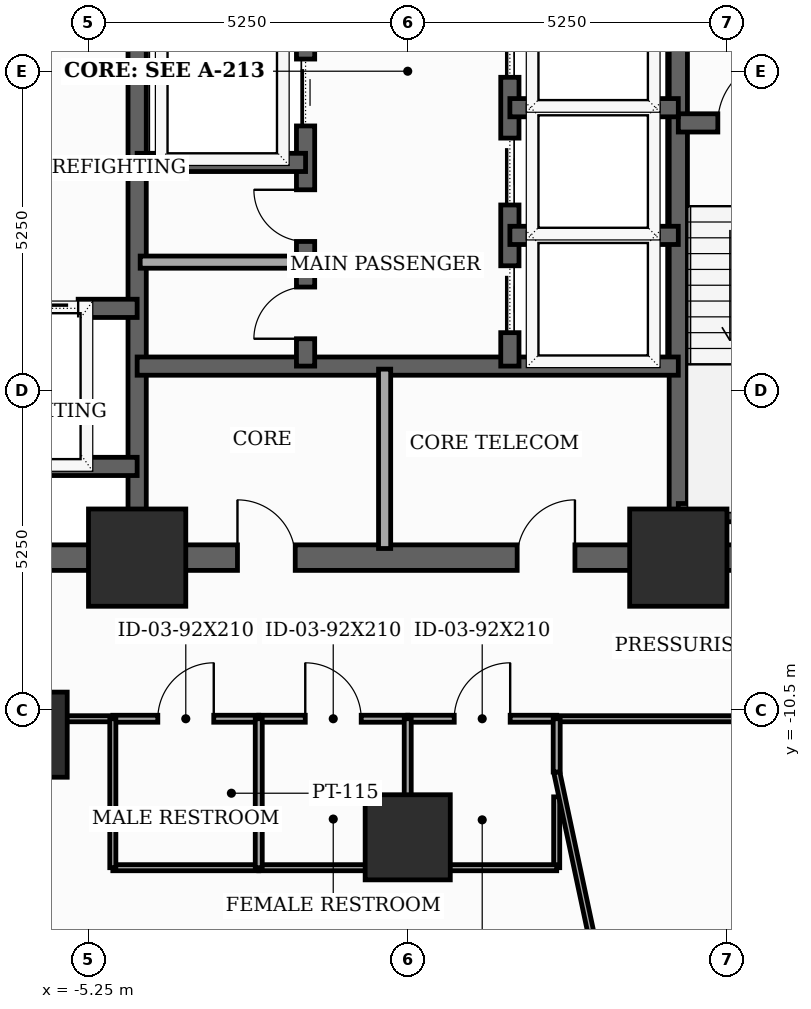
"""IFC4 building model, lengths in metres.
Left out: names, types, materials, properties, quantities, classifications, styles, units other than length and angle.
Written with IfcOpenShell. Run it as: python <this file> out.ifc"""

import sys

from ifc_helpers import new_model, si_unit, direction, frame, frame_2d, origin, origin_2d, place, context, subcontext, project, spatial, rectangle, extrude, element, fill, save


model = new_model("IFC4")
c1 = context("Model", 3, precision=1e-05, world=origin(), true_north=direction((0.0, 1.0)))
c2 = subcontext(c1, "Body", "Model", "MODEL_VIEW")
j1 = project(units=[si_unit("LENGTHUNIT", "METRE"), si_unit("PLANEANGLEUNIT", "RADIAN")], contexts=[c1])
p1 = place(None, origin())
s1 = spatial("IfcSite", under=j1, at=p1, CompositionType="ELEMENT")
p2 = place(p1, origin())
s2 = spatial("IfcBuilding", under=s1, at=p2, CompositionType="ELEMENT")
p3 = place(p2, frame((0.0, 0.0, 33.4)))
s3 = spatial("IfcBuildingStorey", under=s2, at=p3, CompositionType="ELEMENT", Elevation=33.4)
for number, where, z_axis, x_axis in (
    (1, (-4.45, -8.0, 0.0), (0.0, 0.0, 1.0), (1.0, 0.0, 0.0)),
    (2, (4.45, -8.0, 0.0), (0.0, 0.0, 1.0), (1.0, 0.0, 0.0)),
):
    element("IfcColumn", number, at=place(p3, frame(where, z_axis=z_axis, x_axis=x_axis)), inside=s3, PredefinedType="COLUMN", context=c2, shape_type="SweptSolid", body=[
        extrude(rectangle(XDim=1.6, YDim=1.6, at=origin_2d()), origin(), (0.0, 0.0, 1.0), 3.7),
    ])
for number, where, z_axis, x_axis in (
    (3, (-6.3, -10.912, 0.0), (0.0, 0.0, 1.0), (1.0, 0.0, 0.0)),
    (4, (0.0, -12.6, 0.0), (0.0, 0.0, 1.0), (1.0, 0.0, 0.0)),
):
    element("IfcColumn", number, at=place(p3, frame(where, z_axis=z_axis, x_axis=x_axis)), inside=s3, PredefinedType="COLUMN", context=c2, shape_type="SweptSolid", body=[
        extrude(rectangle(XDim=1.4, YDim=1.4, at=origin_2d()), origin(), (0.0, 0.0, 1.0), 3.7),
    ])
p4 = place(p3, frame((-8.0, -8.0, 0.0), z_axis=(0.0, 0.0, 1.0), x_axis=(1.0, 0.0, 0.0)))
e5 = element("IfcWall", 5, at=p4, inside=s3, PredefinedType="SHEAR", context=c2, shape_type="SweptSolid", body=[
    extrude(rectangle(XDim=16.0, YDim=0.42, at=frame_2d((8.0, 0.0))), origin(), (0.0, 0.0, 1.0), 3.5),
])
p5 = place(p4, frame((5.2, 0.0, 0.0)))
e6 = element("IfcOpeningElement", 6, at=p5, cuts=e5, PredefinedType="OPENING", context=c2, shape_type="SweptSolid", body=[
    extrude(rectangle(XDim=0.95, YDim=2.1, at=frame_2d((0.475, 1.05))), frame((0.0, 0.22, 0.0), z_axis=(0.0, -1.0, 0.0), x_axis=(1.0, 0.0, 0.0)), (0.0, 0.0, 1.0), 0.44),
])
p6 = place(p4, frame((9.8, 0.0, 0.0)))
e7 = element("IfcOpeningElement", 7, at=p6, cuts=e5, PredefinedType="OPENING", context=c2, shape_type="SweptSolid", body=[
    extrude(rectangle(XDim=0.95, YDim=2.1, at=frame_2d((0.475, 1.05))), frame((0.0, 0.22, 0.0), z_axis=(0.0, -1.0, 0.0), x_axis=(1.0, 0.0, 0.0)), (0.0, 0.0, 1.0), 0.44),
])
for number, where, z_axis, x_axis in (
    (8, (-4.45, -7.79, 0.0), (0.0, 0.0, 1.0), (0.0, 1.0, 0.0)),
    (9, (4.45, -7.79, 0.0), (0.0, 0.0, 1.0), (0.0, 1.0, 0.0)),
):
    element("IfcWall", number, at=place(p3, frame(where, z_axis=z_axis, x_axis=x_axis)), inside=s3, PredefinedType="SHEAR", context=c2, shape_type="SweptSolid", body=[
        extrude(rectangle(XDim=15.58, YDim=0.3, at=frame_2d((7.79, 0.0))), origin(), (0.0, 0.0, 1.0), 3.5),
    ])
p7 = place(p3, frame((4.45, -0.85, 0.0), z_axis=(0.0, 0.0, 1.0), x_axis=(1.0, 0.0, 0.0)))
e10 = element("IfcWall", 10, at=p7, inside=s3, PredefinedType="SHEAR", context=c2, shape_type="SweptSolid", body=[
    extrude(rectangle(XDim=3.34, YDim=0.3, at=frame_2d((1.67, 0.0))), origin(), (0.0, 0.0, 1.0), 3.5),
])
p8 = place(p7, frame((0.65, 0.0, 0.0)))
e11 = element("IfcOpeningElement", 11, at=p8, cuts=e10, PredefinedType="OPENING", context=c2, shape_type="SweptSolid", body=[
    extrude(rectangle(XDim=1.05, YDim=2.15, at=frame_2d((0.525, 1.075))), frame((0.0, 0.16, 0.0), z_axis=(0.0, -1.0, 0.0), x_axis=(1.0, 0.0, 0.0)), (0.0, 0.0, 1.0), 0.32),
])
p9 = place(p3, frame((4.45, -7.26, 0.0), z_axis=(0.0, 0.0, 1.0), x_axis=(1.0, 0.0, 0.0)))
e12 = element("IfcWall", 12, at=p9, inside=s3, PredefinedType="SHEAR", context=c2, shape_type="SweptSolid", body=[
    extrude(rectangle(XDim=3.55, YDim=0.3, at=frame_2d((1.775, 0.0))), origin(), (0.0, 0.0, 1.0), 3.5),
])
p10 = place(p3, frame((-7.79, -3.9, 0.0), z_axis=(0.0, 0.0, 1.0), x_axis=(1.0, 0.0, 0.0)))
e13 = element("IfcWall", 13, at=p10, inside=s3, PredefinedType="SHEAR", context=c2, shape_type="SweptSolid", body=[
    extrude(rectangle(XDim=3.34, YDim=0.3, at=frame_2d((1.67, 0.0))), origin(), (0.0, 0.0, 1.0), 3.5),
])
p11 = place(p10, frame((1.27, 0.0, 0.0)))
e14 = element("IfcOpeningElement", 14, at=p11, cuts=e13, PredefinedType="OPENING", context=c2, shape_type="SweptSolid", body=[
    extrude(rectangle(XDim=1.1, YDim=2.1, at=frame_2d((0.55, 1.05))), frame((0.0, 0.16, 0.0), z_axis=(0.0, -1.0, 0.0), x_axis=(1.0, 0.0, 0.0)), (0.0, 0.0, 1.0), 0.32),
])
p12 = place(p3, frame((-7.79, -6.5, 0.0), z_axis=(0.0, 0.0, 1.0), x_axis=(1.0, 0.0, 0.0)))
e15 = element("IfcWall", 15, at=p12, inside=s3, PredefinedType="SHEAR", context=c2, shape_type="SweptSolid", body=[
    extrude(rectangle(XDim=3.34, YDim=0.3, at=frame_2d((1.67, 0.0))), origin(), (0.0, 0.0, 1.0), 3.5),
])
p13 = place(p3, frame((-4.45, -4.85, 0.0), z_axis=(0.0, 0.0, 1.0), x_axis=(1.0, 0.0, 0.0)))
e16 = element("IfcWall", 16, at=p13, inside=s3, PredefinedType="SHEAR", context=c2, shape_type="SweptSolid", body=[
    extrude(rectangle(XDim=8.9, YDim=0.3, at=frame_2d((4.45, 0.0))), origin(), (0.0, 0.0, 1.0), 3.5),
])
p14 = place(p3, frame((-1.68, -4.85, 0.0), z_axis=(0.0, 0.0, 1.0), x_axis=(0.0, 1.0, 0.0)))
e17 = element("IfcWall", 17, at=p14, inside=s3, PredefinedType="SHEAR", context=c2, shape_type="SweptSolid", body=[
    extrude(rectangle(XDim=12.64, YDim=0.3, at=frame_2d((6.32, 0.0))), origin(), (0.0, 0.0, 1.0), 3.5),
])
p15 = place(p14, frame((3.95, 0.0, 0.0)))
e18 = element("IfcOpeningElement", 18, at=p15, cuts=e17, PredefinedType="OPENING", context=c2, shape_type="SweptSolid", body=[
    extrude(rectangle(XDim=1.1, YDim=2.1, at=frame_2d((0.55, 1.05))), frame((0.0, 0.16, 0.0), z_axis=(0.0, -1.0, 0.0), x_axis=(1.0, 0.0, 0.0)), (0.0, 0.0, 1.0), 0.32),
])
p16 = place(p14, frame((6.25, 0.0, 0.0)))
e19 = element("IfcOpeningElement", 19, at=p16, cuts=e17, PredefinedType="OPENING", context=c2, shape_type="SweptSolid", body=[
    extrude(rectangle(XDim=1.1, YDim=2.1, at=frame_2d((0.55, 1.05))), frame((0.0, 0.16, 0.0), z_axis=(0.0, -1.0, 0.0), x_axis=(1.0, 0.0, 0.0)), (0.0, 0.0, 1.0), 0.32),
])
p17 = place(p14, frame((8.55, 0.0, 0.0)))
e20 = element("IfcOpeningElement", 20, at=p17, cuts=e17, PredefinedType="OPENING", context=c2, shape_type="SweptSolid", body=[
    extrude(rectangle(XDim=1.1, YDim=2.1, at=frame_2d((0.55, 1.05))), frame((0.0, 0.16, 0.0), z_axis=(0.0, -1.0, 0.0), x_axis=(1.0, 0.0, 0.0)), (0.0, 0.0, 1.0), 0.32),
])
p18 = place(p14, frame((10.85, 0.0, 0.0)))
e21 = element("IfcOpeningElement", 21, at=p18, cuts=e17, PredefinedType="OPENING", context=c2, shape_type="SweptSolid", body=[
    extrude(rectangle(XDim=1.1, YDim=2.1, at=frame_2d((0.55, 1.05))), frame((0.0, 0.16, 0.0), z_axis=(0.0, -1.0, 0.0), x_axis=(1.0, 0.0, 0.0)), (0.0, 0.0, 1.0), 0.32),
])
p19 = place(p14, frame((0.45, 0.0, 0.0)))
e22 = element("IfcOpeningElement", 22, at=p19, cuts=e17, PredefinedType="OPENING", context=c2, shape_type="SweptSolid", body=[
    extrude(rectangle(XDim=0.85, YDim=2.02, at=frame_2d((0.425, 1.01))), frame((0.0, 0.16, 0.0), z_axis=(0.0, -1.0, 0.0), x_axis=(1.0, 0.0, 0.0)), (0.0, 0.0, 1.0), 0.32),
])
p20 = place(p14, frame((2.05, 0.0, 0.0)))
e23 = element("IfcOpeningElement", 23, at=p20, cuts=e17, PredefinedType="OPENING", context=c2, shape_type="SweptSolid", body=[
    extrude(rectangle(XDim=0.85, YDim=2.02, at=frame_2d((0.425, 1.01))), frame((0.0, 0.16, 0.0), z_axis=(0.0, -1.0, 0.0), x_axis=(1.0, 0.0, 0.0)), (0.0, 0.0, 1.0), 0.32),
])
p21 = place(p3, frame((1.68, -4.85, 0.0), z_axis=(0.0, 0.0, 1.0), x_axis=(0.0, 1.0, 0.0)))
e24 = element("IfcWall", 24, at=p21, inside=s3, PredefinedType="SHEAR", context=c2, shape_type="SweptSolid", body=[
    extrude(rectangle(XDim=12.64, YDim=0.3, at=frame_2d((6.32, 0.0))), origin(), (0.0, 0.0, 1.0), 3.5),
])
p22 = place(p21, frame((0.55, 0.0, 0.0)))
e25 = element("IfcOpeningElement", 25, at=p22, cuts=e24, PredefinedType="OPENING", context=c2, shape_type="SweptSolid", body=[
    extrude(rectangle(XDim=1.1, YDim=2.1, at=frame_2d((0.55, 1.05))), frame((0.0, 0.16, 0.0), z_axis=(0.0, -1.0, 0.0), x_axis=(1.0, 0.0, 0.0)), (0.0, 0.0, 1.0), 0.32),
])
p23 = place(p21, frame((2.65, 0.0, 0.0)))
e26 = element("IfcOpeningElement", 26, at=p23, cuts=e24, PredefinedType="OPENING", context=c2, shape_type="SweptSolid", body=[
    extrude(rectangle(XDim=1.1, YDim=2.1, at=frame_2d((0.55, 1.05))), frame((0.0, 0.16, 0.0), z_axis=(0.0, -1.0, 0.0), x_axis=(1.0, 0.0, 0.0)), (0.0, 0.0, 1.0), 0.32),
])
p24 = place(p21, frame((4.75, 0.0, 0.0)))
e27 = element("IfcOpeningElement", 27, at=p24, cuts=e24, PredefinedType="OPENING", context=c2, shape_type="SweptSolid", body=[
    extrude(rectangle(XDim=1.1, YDim=2.1, at=frame_2d((0.55, 1.05))), frame((0.0, 0.16, 0.0), z_axis=(0.0, -1.0, 0.0), x_axis=(1.0, 0.0, 0.0)), (0.0, 0.0, 1.0), 0.32),
])
p25 = place(p21, frame((6.85, 0.0, 0.0)))
e28 = element("IfcOpeningElement", 28, at=p25, cuts=e24, PredefinedType="OPENING", context=c2, shape_type="SweptSolid", body=[
    extrude(rectangle(XDim=1.1, YDim=2.1, at=frame_2d((0.55, 1.05))), frame((0.0, 0.16, 0.0), z_axis=(0.0, -1.0, 0.0), x_axis=(1.0, 0.0, 0.0)), (0.0, 0.0, 1.0), 0.32),
])
p26 = place(p21, frame((8.95, 0.0, 0.0)))
e29 = element("IfcOpeningElement", 29, at=p26, cuts=e24, PredefinedType="OPENING", context=c2, shape_type="SweptSolid", body=[
    extrude(rectangle(XDim=1.1, YDim=2.1, at=frame_2d((0.55, 1.05))), frame((0.0, 0.16, 0.0), z_axis=(0.0, -1.0, 0.0), x_axis=(1.0, 0.0, 0.0)), (0.0, 0.0, 1.0), 0.32),
])
p27 = place(p21, frame((11.05, 0.0, 0.0)))
e30 = element("IfcOpeningElement", 30, at=p27, cuts=e24, PredefinedType="OPENING", context=c2, shape_type="SweptSolid", body=[
    extrude(rectangle(XDim=1.1, YDim=2.1, at=frame_2d((0.55, 1.05))), frame((0.0, 0.16, 0.0), z_axis=(0.0, -1.0, 0.0), x_axis=(1.0, 0.0, 0.0)), (0.0, 0.0, 1.0), 0.32),
])
for number, where, z_axis, x_axis in (
    (31, (-4.45, -1.5, 0.0), (0.0, 0.0, 1.0), (1.0, 0.0, 0.0)),
    (32, (1.68, -2.7, 0.0), (0.0, 0.0, 1.0), (1.0, 0.0, 0.0)),
    (33, (1.68, -0.6, 0.0), (0.0, 0.0, 1.0), (1.0, 0.0, 0.0)),
):
    element("IfcWall", number, at=place(p3, frame(where, z_axis=z_axis, x_axis=x_axis)), inside=s3, PredefinedType="SHEAR", context=c2, shape_type="SweptSolid", body=[
        extrude(rectangle(XDim=2.77, YDim=0.3, at=frame_2d((1.385, 0.0))), origin(), (0.0, 0.0, 1.0), 3.5),
    ])
p28 = place(p3, frame((-0.38, -7.85, 0.0), z_axis=(0.0, 0.0, 1.0), x_axis=(0.0, 1.0, 0.0)))
e34 = element("IfcWall", 34, at=p28, inside=s3, PredefinedType="SOLIDWALL", context=c2, shape_type="SweptSolid", body=[
    extrude(rectangle(XDim=2.95, YDim=0.2, at=frame_2d((1.475, 0.0))), origin(), (0.0, 0.0, 1.0), 2.885),
])
p29 = place(p3, frame((-4.4, -3.14, 0.0), z_axis=(0.0, 0.0, 1.0), x_axis=(1.0, 0.0, 0.0)))
e35 = element("IfcWall", 35, at=p29, inside=s3, PredefinedType="SOLIDWALL", context=c2, shape_type="SweptSolid", body=[
    extrude(rectangle(XDim=2.68, YDim=0.2, at=frame_2d((1.34, 0.0))), origin(), (0.0, 0.0, 1.0), 3.5),
])
p30 = place(p3, frame((-10.15, -10.65, 0.0), z_axis=(0.0, 0.0, 1.0), x_axis=(1.0, 0.0, 0.0)))
e36 = element("IfcWall", 36, at=p30, inside=s3, PredefinedType="MOVABLE", context=c2, shape_type="SweptSolid", body=[
    extrude(rectangle(XDim=5.3, YDim=0.1, at=frame_2d((2.65, 0.0))), origin(), (0.0, 0.0, 1.0), 2.785),
])
p31 = place(p30, frame((0.6, 0.0, 0.0)))
e37 = element("IfcOpeningElement", 37, at=p31, cuts=e36, PredefinedType="OPENING", context=c2, shape_type="SweptSolid", body=[
    extrude(rectangle(XDim=0.92, YDim=2.1, at=frame_2d((0.46, 1.05))), frame((0.0, 0.06, 0.0), z_axis=(0.0, -1.0, 0.0), x_axis=(1.0, 0.0, 0.0)), (0.0, 0.0, 1.0), 0.12),
])
p32 = place(p3, frame((-4.85, -10.65, 0.0), z_axis=(0.0, 0.0, 1.0), x_axis=(1.0, 0.0, 0.0)))
e38 = element("IfcWall", 38, at=p32, inside=s3, PredefinedType="PARTITIONING", context=c2, shape_type="SweptSolid", body=[
    extrude(rectangle(XDim=2.4, YDim=0.115, at=frame_2d((1.2, 0.0))), origin(), (0.0, 0.0, 1.0), 3.5),
])
p33 = place(p32, frame((0.74, 0.0, 0.0)))
e39 = element("IfcOpeningElement", 39, at=p33, cuts=e38, PredefinedType="OPENING", context=c2, shape_type="SweptSolid", body=[
    extrude(rectangle(XDim=0.92, YDim=2.1, at=frame_2d((0.46, 1.05))), frame((0.0, 0.067, 0.0), z_axis=(0.0, -1.0, 0.0), x_axis=(1.0, 0.0, 0.0)), (0.0, 0.0, 1.0), 0.135),
])
p34 = place(p3, frame((-2.45, -10.65, 0.0), z_axis=(0.0, 0.0, 1.0), x_axis=(1.0, 0.0, 0.0)))
e40 = element("IfcWall", 40, at=p34, inside=s3, PredefinedType="PARTITIONING", context=c2, shape_type="SweptSolid", body=[
    extrude(rectangle(XDim=2.45, YDim=0.115, at=frame_2d((1.225, 0.0))), origin(), (0.0, 0.0, 1.0), 2.785),
])
p35 = place(p34, frame((0.765, 0.0, 0.0)))
e41 = element("IfcOpeningElement", 41, at=p35, cuts=e40, PredefinedType="OPENING", context=c2, shape_type="SweptSolid", body=[
    extrude(rectangle(XDim=0.92, YDim=2.1, at=frame_2d((0.46, 1.05))), frame((0.0, 0.067, 0.0), z_axis=(0.0, -1.0, 0.0), x_axis=(1.0, 0.0, 0.0)), (0.0, 0.0, 1.0), 0.135),
])
p36 = place(p3, frame((0.0, -10.65, 0.0), z_axis=(0.0, 0.0, 1.0), x_axis=(1.0, 0.0, 0.0)))
e42 = element("IfcWall", 42, at=p36, inside=s3, PredefinedType="PARTITIONING", context=c2, shape_type="SweptSolid", body=[
    extrude(rectangle(XDim=2.45, YDim=0.115, at=frame_2d((1.225, 0.0))), origin(), (0.0, 0.0, 1.0), 3.5),
])
p37 = place(p36, frame((0.765, 0.0, 0.0)))
e43 = element("IfcOpeningElement", 43, at=p37, cuts=e42, PredefinedType="OPENING", context=c2, shape_type="SweptSolid", body=[
    extrude(rectangle(XDim=0.92, YDim=2.1, at=frame_2d((0.46, 1.05))), frame((0.0, 0.067, 0.0), z_axis=(0.0, -1.0, 0.0), x_axis=(1.0, 0.0, 0.0)), (0.0, 0.0, 1.0), 0.135),
])
p38 = place(p3, frame((2.45, -10.65, 0.0), z_axis=(0.0, 0.0, 1.0), x_axis=(1.0, 0.0, 0.0)))
e44 = element("IfcWall", 44, at=p38, inside=s3, PredefinedType="MOVABLE", context=c2, shape_type="SweptSolid", body=[
    extrude(rectangle(XDim=7.7, YDim=0.1, at=frame_2d((3.85, 0.0))), origin(), (0.0, 0.0, 1.0), 2.785),
])
p39 = place(p3, frame((-3.33, -15.445, 0.0), z_axis=(0.0, 0.0, 1.0), x_axis=(-0.90631018164, 0.422613126458, 0.0)))
e45 = element("IfcWall", 45, at=p39, inside=s3, PredefinedType="PARTITIONING", context=c2, shape_type="SweptSolid", body=[
    extrude(rectangle(XDim=7.018, YDim=0.135, at=frame_2d((3.509, 0.0))), origin(), (0.0, 0.0, 1.0), 2.685),
])
p40 = place(p3, frame((-2.45, -13.1, 0.0), z_axis=(0.0, 0.0, 1.0), x_axis=(-1.0, 0.0, 0.0)))
e46 = element("IfcWall", 46, at=p40, inside=s3, PredefinedType="MOVABLE", context=c2, shape_type="SweptSolid", body=[
    extrude(rectangle(XDim=2.4, YDim=0.1, at=frame_2d((1.2, 0.0))), origin(), (0.0, 0.0, 1.0), 3.5),
])
p41 = place(p3, frame((-4.85, -13.1, 0.0), z_axis=(0.0, 0.0, 1.0), x_axis=(0.0, 1.0, 0.0)))
e47 = element("IfcWall", 47, at=p41, inside=s3, PredefinedType="MOVABLE", context=c2, shape_type="SweptSolid", body=[
    extrude(rectangle(XDim=2.45, YDim=0.1, at=frame_2d((1.225, 0.0))), origin(), (0.0, 0.0, 1.0), 2.785),
])
p42 = place(p3, frame((0.0, -13.1, 0.0), z_axis=(0.0, 0.0, 1.0), x_axis=(-1.0, 0.0, 0.0)))
e48 = element("IfcWall", 48, at=p42, inside=s3, PredefinedType="MOVABLE", context=c2, shape_type="SweptSolid", body=[
    extrude(rectangle(XDim=2.45, YDim=0.1, at=frame_2d((1.225, 0.0))), origin(), (0.0, 0.0, 1.0), 3.5),
])
p43 = place(p3, frame((2.45, -11.935, 0.0), z_axis=(0.0, 0.0, 1.0), x_axis=(0.0, -1.0, 0.0)))
e49 = element("IfcWall", 49, at=p43, inside=s3, PredefinedType="MOVABLE", context=c2, shape_type="SweptSolid", body=[
    extrude(rectangle(XDim=1.166, YDim=0.1, at=frame_2d((0.583, 0.0))), origin(), (0.0, 0.0, 1.0), 2.785),
])
p44 = place(p3, frame((2.45, -13.1, 0.0), z_axis=(0.0, 0.0, 1.0), x_axis=(-1.0, 0.0, 0.0)))
e50 = element("IfcWall", 50, at=p44, inside=s3, PredefinedType="MOVABLE", context=c2, shape_type="SweptSolid", body=[
    extrude(rectangle(XDim=2.45, YDim=0.1, at=frame_2d((1.225, 0.0))), origin(), (0.0, 0.0, 1.0), 3.5),
])
p45 = place(p3, frame((3.267, -15.368, 0.0), z_axis=(0.0, 0.0, 1.0), x_axis=(-0.208030469109, 0.978122346091, 0.0)))
e51 = element("IfcWall", 51, at=p45, inside=s3, PredefinedType="MOVABLE", context=c2, shape_type="SweptSolid", body=[
    extrude(rectangle(XDim=3.928, YDim=0.1, at=frame_2d((1.964, 0.0))), origin(), (0.0, 0.0, 1.0), 2.785),
])
for number, where, z_axis, x_axis in (
    (52, (-2.45, -13.1, 0.0), (0.0, 0.0, 1.0), (0.0, 1.0, 0.0)),
    (53, (0.0, -13.1, 0.0), (0.0, 0.0, 1.0), (0.0, 1.0, 0.0)),
):
    element("IfcWall", number, at=place(p3, frame(where, z_axis=z_axis, x_axis=x_axis)), inside=s3, PredefinedType="PARTITIONING", context=c2, shape_type="SweptSolid", body=[
        extrude(rectangle(XDim=2.45, YDim=0.115, at=frame_2d((1.225, 0.0))), origin(), (0.0, 0.0, 1.0), 2.785),
    ])
p46 = place(p3, frame((2.45, -11.526, 0.0), z_axis=(0.0, 0.0, 1.0), x_axis=(0.0, 1.0, 0.0)))
e54 = element("IfcWall", 54, at=p46, inside=s3, PredefinedType="PARTITIONING", context=c2, shape_type="SweptSolid", body=[
    extrude(rectangle(XDim=0.876, YDim=0.115, at=frame_2d((0.438, 0.0))), origin(), (0.0, 0.0, 1.0), 3.5),
])
p47 = place(p5, origin())
e55 = element("IfcDoor", 55, at=p47, inside=s3, OperationType="SINGLE_SWING_LEFT", PredefinedType="DOOR", context=c2, shape_type="SweptSolid", body=[
    extrude(rectangle(XDim=0.95, YDim=2.1, at=frame_2d((0.475, 1.05))), frame((0.0, 0.025, 0.0), z_axis=(0.0, -1.0, 0.0), x_axis=(1.0, 0.0, 0.0)), (0.0, 0.0, 1.0), 0.05),
])
fill(e6, e55)
p48 = place(p6, origin())
e56 = element("IfcDoor", 56, at=p48, inside=s3, OperationType="SINGLE_SWING_RIGHT", PredefinedType="DOOR", context=c2, shape_type="SweptSolid", body=[
    extrude(rectangle(XDim=0.95, YDim=2.1, at=frame_2d((0.475, 1.05))), frame((0.0, 0.025, 0.0), z_axis=(0.0, -1.0, 0.0), x_axis=(1.0, 0.0, 0.0)), (0.0, 0.0, 1.0), 0.05),
])
fill(e7, e56)
p49 = place(p8, origin())
e57 = element("IfcDoor", 57, at=p49, inside=s3, OperationType="SINGLE_SWING_RIGHT", PredefinedType="DOOR", context=c2, shape_type="SweptSolid", body=[
    extrude(rectangle(XDim=1.05, YDim=2.15, at=frame_2d((0.525, 1.075))), frame((0.0, 0.025, 0.0), z_axis=(0.0, -1.0, 0.0), x_axis=(1.0, 0.0, 0.0)), (0.0, 0.0, 1.0), 0.05),
])
fill(e11, e57)
p50 = place(p11, origin())
e58 = element("IfcDoor", 58, at=p50, inside=s3, OperationType="SLIDING_TO_LEFT", PredefinedType="DOOR", context=c2, shape_type="SweptSolid", body=[
    extrude(rectangle(XDim=1.1, YDim=2.1, at=frame_2d((0.55, 1.05))), frame((0.0, 0.025, 0.0), z_axis=(0.0, -1.0, 0.0), x_axis=(1.0, 0.0, 0.0)), (0.0, 0.0, 1.0), 0.05),
])
fill(e14, e58)
p51 = place(p15, origin())
e59 = element("IfcDoor", 59, at=p51, inside=s3, OperationType="SLIDING_TO_LEFT", PredefinedType="DOOR", context=c2, shape_type="SweptSolid", body=[
    extrude(rectangle(XDim=1.1, YDim=2.1, at=frame_2d((0.55, 1.05))), frame((0.0, 0.025, 0.0), z_axis=(0.0, -1.0, 0.0), x_axis=(1.0, 0.0, 0.0)), (0.0, 0.0, 1.0), 0.05),
])
fill(e18, e59)
p52 = place(p19, origin())
e60 = element("IfcDoor", 60, at=p52, inside=s3, OperationType="SINGLE_SWING_LEFT", PredefinedType="TRAPDOOR", context=c2, shape_type="SweptSolid", body=[
    extrude(rectangle(XDim=0.85, YDim=2.02, at=frame_2d((0.425, 1.01))), frame((0.0, 0.025, 0.0), z_axis=(0.0, -1.0, 0.0), x_axis=(1.0, 0.0, 0.0)), (0.0, 0.0, 1.0), 0.05),
])
fill(e22, e60)
p53 = place(p20, origin())
e61 = element("IfcDoor", 61, at=p53, inside=s3, OperationType="SINGLE_SWING_RIGHT", PredefinedType="TRAPDOOR", context=c2, shape_type="SweptSolid", body=[
    extrude(rectangle(XDim=0.85, YDim=2.02, at=frame_2d((0.425, 1.01))), frame((0.0, 0.025, 0.0), z_axis=(0.0, -1.0, 0.0), x_axis=(1.0, 0.0, 0.0)), (0.0, 0.0, 1.0), 0.05),
])
fill(e23, e61)
p54 = place(p22, origin())
e62 = element("IfcDoor", 62, at=p54, inside=s3, OperationType="SLIDING_TO_LEFT", PredefinedType="DOOR", context=c2, shape_type="SweptSolid", body=[
    extrude(rectangle(XDim=1.1, YDim=2.1, at=frame_2d((0.55, 1.05))), frame((0.0, 0.025, 0.0), z_axis=(0.0, -1.0, 0.0), x_axis=(1.0, 0.0, 0.0)), (0.0, 0.0, 1.0), 0.05),
])
fill(e25, e62)
p55 = place(p23, origin())
e63 = element("IfcDoor", 63, at=p55, inside=s3, OperationType="SLIDING_TO_LEFT", PredefinedType="DOOR", context=c2, shape_type="SweptSolid", body=[
    extrude(rectangle(XDim=1.1, YDim=2.1, at=frame_2d((0.55, 1.05))), frame((0.0, 0.025, 0.0), z_axis=(0.0, -1.0, 0.0), x_axis=(1.0, 0.0, 0.0)), (0.0, 0.0, 1.0), 0.05),
])
fill(e26, e63)
p56 = place(p24, origin())
e64 = element("IfcDoor", 64, at=p56, inside=s3, OperationType="SLIDING_TO_LEFT", PredefinedType="DOOR", context=c2, shape_type="SweptSolid", body=[
    extrude(rectangle(XDim=1.1, YDim=2.1, at=frame_2d((0.55, 1.05))), frame((0.0, 0.025, 0.0), z_axis=(0.0, -1.0, 0.0), x_axis=(1.0, 0.0, 0.0)), (0.0, 0.0, 1.0), 0.05),
])
fill(e27, e64)
p57 = place(p33, origin())
e65 = element("IfcDoor", 65, at=p57, inside=s3, OperationType="SINGLE_SWING_RIGHT", PredefinedType="DOOR", context=c2, shape_type="SweptSolid", body=[
    extrude(rectangle(XDim=0.92, YDim=2.1, at=frame_2d((0.46, 1.05))), frame((0.0, 0.025, 0.0), z_axis=(0.0, -1.0, 0.0), x_axis=(1.0, 0.0, 0.0)), (0.0, 0.0, 1.0), 0.05),
])
fill(e39, e65)
p58 = place(p35, origin())
e66 = element("IfcDoor", 66, at=p58, inside=s3, OperationType="SINGLE_SWING_LEFT", PredefinedType="DOOR", context=c2, shape_type="SweptSolid", body=[
    extrude(rectangle(XDim=0.92, YDim=2.1, at=frame_2d((0.46, 1.05))), frame((0.0, 0.025, 0.0), z_axis=(0.0, -1.0, 0.0), x_axis=(1.0, 0.0, 0.0)), (0.0, 0.0, 1.0), 0.05),
])
fill(e41, e66)
p59 = place(p37, origin())
e67 = element("IfcDoor", 67, at=p59, inside=s3, OperationType="SINGLE_SWING_RIGHT", PredefinedType="DOOR", context=c2, shape_type="SweptSolid", body=[
    extrude(rectangle(XDim=0.92, YDim=2.1, at=frame_2d((0.46, 1.05))), frame((0.0, 0.025, 0.0), z_axis=(0.0, -1.0, 0.0), x_axis=(1.0, 0.0, 0.0)), (0.0, 0.0, 1.0), 0.05),
])
fill(e43, e67)
save(model, sys.argv[1])
